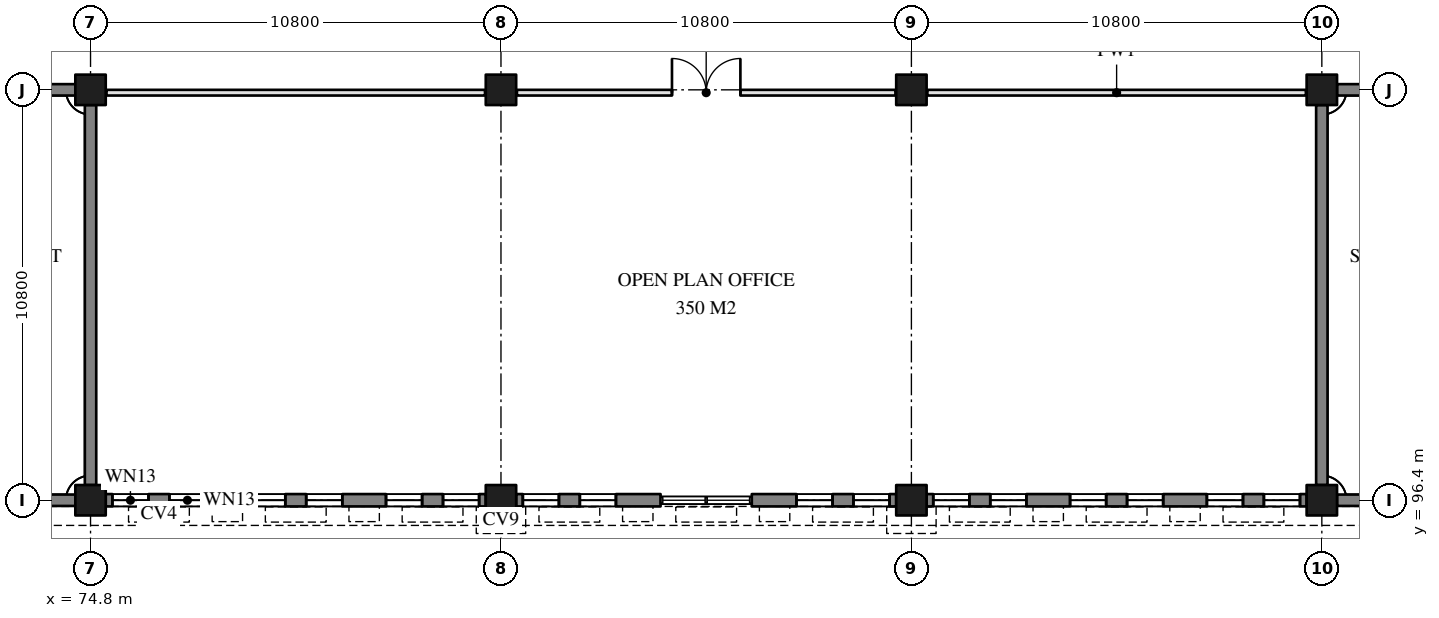
"""IFC4 building model, lengths in metres.
Left out: names, types, materials, properties, quantities, classifications, styles, units other than length and angle.
Written with IfcOpenShell. Run it as: python <this file> out.ifc"""

import sys

from ifc_helpers import new_model, si_unit, direction, frame, frame_2d, origin, origin_2d, place, context, subcontext, project, spatial, rectangle, extrude, element, fill, save


model = new_model("IFC4")
c1 = context("Model", 3, precision=1e-05, world=origin(), true_north=direction((0.0, 1.0)))
c2 = subcontext(c1, "Body", "Model", "MODEL_VIEW")
j1 = project(units=[si_unit("LENGTHUNIT", "METRE"), si_unit("PLANEANGLEUNIT", "RADIAN")], contexts=[c1])
p1 = place(None, origin())
s1 = spatial("IfcSite", under=j1, at=p1, CompositionType="ELEMENT")
p2 = place(p1, origin())
s2 = spatial("IfcBuilding", under=s1, at=p2, CompositionType="ELEMENT")
p3 = place(p2, frame((0.0, 0.0, 12.6)))
s3 = spatial("IfcBuildingStorey", under=s2, at=p3, CompositionType="ELEMENT", Elevation=12.6)
for number, where, z_axis, x_axis in (
    (1, (74.8, 96.4, 0.0), (0.0, 0.0, 1.0), (1.0, 0.0, 0.0)),
    (2, (74.8, 107.2, 0.0), (0.0, 0.0, 1.0), (1.0, 0.0, 0.0)),
    (3, (85.6, 96.4, 0.0), (0.0, 0.0, 1.0), (1.0, 0.0, 0.0)),
    (4, (85.6, 107.2, 0.0), (0.0, 0.0, 1.0), (1.0, 0.0, 0.0)),
    (5, (96.4, 96.4, 0.0), (0.0, 0.0, 1.0), (1.0, 0.0, 0.0)),
    (6, (96.4, 107.2, 0.0), (0.0, 0.0, 1.0), (1.0, 0.0, 0.0)),
    (7, (107.2, 96.4, 0.0), (0.0, 0.0, 1.0), (1.0, 0.0, 0.0)),
    (8, (107.2, 107.2, 0.0), (0.0, 0.0, 1.0), (1.0, 0.0, 0.0)),
):
    element("IfcColumn", number, at=place(p3, frame(where, z_axis=z_axis, x_axis=x_axis)), inside=s3, PredefinedType="COLUMN", context=c2, shape_type="SweptSolid", body=[
        extrude(rectangle(XDim=0.8, YDim=0.8, at=origin_2d()), origin(), (0.0, 0.0, 1.0), 3.9),
    ])
for number, where, z_axis, x_axis in (
    (9, (64.4, 96.4, 0.0), (0.0, 0.0, 1.0), (1.0, 0.0, 0.0)),
    (10, (74.8, 96.8, 0.0), (0.0, 0.0, 1.0), (0.0, 1.0, 0.0)),
):
    element("IfcWall", number, at=place(p3, frame(where, z_axis=z_axis, x_axis=x_axis)), inside=s3, PredefinedType="SOLIDWALL", context=c2, shape_type="SweptSolid", body=[
        extrude(rectangle(XDim=10.0, YDim=0.3, at=frame_2d((5.0, 0.0))), origin(), (0.0, 0.0, 1.0), 3.9),
    ])
p4 = place(p3, frame((74.4, 107.2, 0.0), z_axis=(0.0, 0.0, 1.0), x_axis=(-1.0, 0.0, 0.0)))
e11 = element("IfcWall", 11, at=p4, inside=s3, PredefinedType="SOLIDWALL", context=c2, shape_type="SweptSolid", body=[
    extrude(rectangle(XDim=10.0, YDim=0.3, at=frame_2d((5.0, 0.0))), origin(), (0.0, 0.0, 1.0), 3.9),
])
p5 = place(p4, frame((2.0, 0.0, 0.0)))
e12 = element("IfcOpeningElement", 12, at=p5, cuts=e11, PredefinedType="OPENING", context=c2, shape_type="SweptSolid", body=[
    extrude(rectangle(XDim=1.8, YDim=2.1, at=frame_2d((0.9, 1.05))), frame((0.0, 0.16, 0.0), z_axis=(0.0, -1.0, 0.0), x_axis=(1.0, 0.0, 0.0)), (0.0, 0.0, 1.0), 0.32),
])
p6 = place(p4, frame((4.4, 0.0, 0.0)))
e13 = element("IfcOpeningElement", 13, at=p6, cuts=e11, PredefinedType="OPENING", context=c2, shape_type="SweptSolid", body=[
    extrude(rectangle(XDim=1.0, YDim=2.1, at=frame_2d((0.5, 1.05))), frame((0.0, 0.16, 0.0), z_axis=(0.0, -1.0, 0.0), x_axis=(1.0, 0.0, 0.0)), (0.0, 0.0, 1.0), 0.32),
])
p7 = place(p4, frame((6.8, 0.0, 0.0)))
e14 = element("IfcOpeningElement", 14, at=p7, cuts=e11, PredefinedType="OPENING", context=c2, shape_type="SweptSolid", body=[
    extrude(rectangle(XDim=0.9, YDim=2.1, at=frame_2d((0.45, 1.05))), frame((0.0, 0.16, 0.0), z_axis=(0.0, -1.0, 0.0), x_axis=(1.0, 0.0, 0.0)), (0.0, 0.0, 1.0), 0.32),
])
p8 = place(p3, frame((107.6, 96.4, 0.0), z_axis=(0.0, 0.0, 1.0), x_axis=(1.0, 0.0, 0.0)))
e15 = element("IfcWall", 15, at=p8, inside=s3, PredefinedType="SOLIDWALL", context=c2, shape_type="SweptSolid", body=[
    extrude(rectangle(XDim=10.0, YDim=0.3, at=frame_2d((5.0, 0.0))), origin(), (0.0, 0.0, 1.0), 3.9),
])
p9 = place(p3, frame((117.6, 107.2, 0.0), z_axis=(0.0, 0.0, 1.0), x_axis=(-1.0, 0.0, 0.0)))
e16 = element("IfcWall", 16, at=p9, inside=s3, PredefinedType="SOLIDWALL", context=c2, shape_type="SweptSolid", body=[
    extrude(rectangle(XDim=10.0, YDim=0.3, at=frame_2d((5.0, 0.0))), origin(), (0.0, 0.0, 1.0), 3.9),
])
p10 = place(p9, frame((6.2, 0.0, 0.0)))
e17 = element("IfcOpeningElement", 17, at=p10, cuts=e16, PredefinedType="OPENING", context=c2, shape_type="SweptSolid", body=[
    extrude(rectangle(XDim=1.8, YDim=2.1, at=frame_2d((0.9, 1.05))), frame((0.0, 0.16, 0.0), z_axis=(0.0, -1.0, 0.0), x_axis=(1.0, 0.0, 0.0)), (0.0, 0.0, 1.0), 0.32),
])
p11 = place(p9, frame((4.6, 0.0, 0.0)))
e18 = element("IfcOpeningElement", 18, at=p11, cuts=e16, PredefinedType="OPENING", context=c2, shape_type="SweptSolid", body=[
    extrude(rectangle(XDim=1.0, YDim=2.1, at=frame_2d((0.5, 1.05))), frame((0.0, 0.16, 0.0), z_axis=(0.0, -1.0, 0.0), x_axis=(1.0, 0.0, 0.0)), (0.0, 0.0, 1.0), 0.32),
])
p12 = place(p9, frame((2.3, 0.0, 0.0)))
e19 = element("IfcOpeningElement", 19, at=p12, cuts=e16, PredefinedType="OPENING", context=c2, shape_type="SweptSolid", body=[
    extrude(rectangle(XDim=0.9, YDim=2.1, at=frame_2d((0.45, 1.05))), frame((0.0, 0.16, 0.0), z_axis=(0.0, -1.0, 0.0), x_axis=(1.0, 0.0, 0.0)), (0.0, 0.0, 1.0), 0.32),
])
p13 = place(p3, frame((107.2, 106.8, 0.0), z_axis=(0.0, 0.0, 1.0), x_axis=(0.0, -1.0, 0.0)))
e20 = element("IfcWall", 20, at=p13, inside=s3, PredefinedType="SOLIDWALL", context=c2, shape_type="SweptSolid", body=[
    extrude(rectangle(XDim=10.0, YDim=0.3, at=frame_2d((5.0, 0.0))), origin(), (0.0, 0.0, 1.0), 3.9),
])
p14 = place(p3, frame((75.2, 96.4, 0.0), z_axis=(0.0, 0.0, 1.0), x_axis=(1.0, 0.0, 0.0)))
e21 = element("IfcWall", 21, at=p14, inside=s3, PredefinedType="SOLIDWALL", context=c2, shape_type="SweptSolid", body=[
    extrude(rectangle(XDim=10.0, YDim=0.325, at=frame_2d((5.0, 0.0))), origin(), (0.0, 0.0, 1.0), 2.8),
])
p15 = place(p14, frame((0.175, 0.0, 0.5)))
e22 = element("IfcOpeningElement", 22, at=p15, cuts=e21, PredefinedType="OPENING", context=c2, shape_type="SweptSolid", body=[
    extrude(rectangle(XDim=0.95, YDim=2.25, at=frame_2d((0.475, 1.125))), frame((0.0, 0.172, 0.0), z_axis=(0.0, -1.0, 0.0), x_axis=(1.0, 0.0, 0.0)), (0.0, 0.0, 1.0), 0.345),
])
p16 = place(p14, frame((3.775, 0.0, 0.5)))
e23 = element("IfcOpeningElement", 23, at=p16, cuts=e21, PredefinedType="OPENING", context=c2, shape_type="SweptSolid", body=[
    extrude(rectangle(XDim=0.95, YDim=2.25, at=frame_2d((0.475, 1.125))), frame((0.0, 0.172, 0.0), z_axis=(0.0, -1.0, 0.0), x_axis=(1.0, 0.0, 0.0)), (0.0, 0.0, 1.0), 0.345),
])
p17 = place(p14, frame((7.375, 0.0, 0.5)))
e24 = element("IfcOpeningElement", 24, at=p17, cuts=e21, PredefinedType="OPENING", context=c2, shape_type="SweptSolid", body=[
    extrude(rectangle(XDim=0.95, YDim=2.25, at=frame_2d((0.475, 1.125))), frame((0.0, 0.172, 0.0), z_axis=(0.0, -1.0, 0.0), x_axis=(1.0, 0.0, 0.0)), (0.0, 0.0, 1.0), 0.345),
])
p18 = place(p14, frame((1.675, 0.0, 0.5)))
e25 = element("IfcOpeningElement", 25, at=p18, cuts=e21, PredefinedType="OPENING", context=c2, shape_type="SweptSolid", body=[
    extrude(rectangle(XDim=0.95, YDim=2.25, at=frame_2d((0.475, 1.125))), frame((0.0, 0.172, 0.0), z_axis=(0.0, -1.0, 0.0), x_axis=(1.0, 0.0, 0.0)), (0.0, 0.0, 1.0), 0.345),
])
p19 = place(p14, frame((5.275, 0.0, 0.5)))
e26 = element("IfcOpeningElement", 26, at=p19, cuts=e21, PredefinedType="OPENING", context=c2, shape_type="SweptSolid", body=[
    extrude(rectangle(XDim=0.95, YDim=2.25, at=frame_2d((0.475, 1.125))), frame((0.0, 0.172, 0.0), z_axis=(0.0, -1.0, 0.0), x_axis=(1.0, 0.0, 0.0)), (0.0, 0.0, 1.0), 0.345),
])
p20 = place(p14, frame((8.875, 0.0, 0.5)))
e27 = element("IfcOpeningElement", 27, at=p20, cuts=e21, PredefinedType="OPENING", context=c2, shape_type="SweptSolid", body=[
    extrude(rectangle(XDim=0.95, YDim=2.25, at=frame_2d((0.475, 1.125))), frame((0.0, 0.172, 0.0), z_axis=(0.0, -1.0, 0.0), x_axis=(1.0, 0.0, 0.0)), (0.0, 0.0, 1.0), 0.345),
])
p21 = place(p3, frame((86.0, 96.4, 0.0), z_axis=(0.0, 0.0, 1.0), x_axis=(1.0, 0.0, 0.0)))
e28 = element("IfcWall", 28, at=p21, inside=s3, PredefinedType="SOLIDWALL", context=c2, shape_type="SweptSolid", body=[
    extrude(rectangle(XDim=3.8, YDim=0.325, at=frame_2d((1.9, 0.0))), origin(), (0.0, 0.0, 1.0), 2.8),
])
p22 = place(p21, frame((0.175, 0.0, 0.5)))
e29 = element("IfcOpeningElement", 29, at=p22, cuts=e28, PredefinedType="OPENING", context=c2, shape_type="SweptSolid", body=[
    extrude(rectangle(XDim=0.95, YDim=2.25, at=frame_2d((0.475, 1.125))), frame((0.0, 0.172, 0.0), z_axis=(0.0, -1.0, 0.0), x_axis=(1.0, 0.0, 0.0)), (0.0, 0.0, 1.0), 0.345),
])
p23 = place(p21, frame((1.675, 0.0, 0.5)))
e30 = element("IfcOpeningElement", 30, at=p23, cuts=e28, PredefinedType="OPENING", context=c2, shape_type="SweptSolid", body=[
    extrude(rectangle(XDim=0.95, YDim=2.25, at=frame_2d((0.475, 1.125))), frame((0.0, 0.172, 0.0), z_axis=(0.0, -1.0, 0.0), x_axis=(1.0, 0.0, 0.0)), (0.0, 0.0, 1.0), 0.345),
])
p24 = place(p3, frame((92.2, 96.4, 0.0), z_axis=(0.0, 0.0, 1.0), x_axis=(1.0, 0.0, 0.0)))
e31 = element("IfcWall", 31, at=p24, inside=s3, PredefinedType="SOLIDWALL", context=c2, shape_type="SweptSolid", body=[
    extrude(rectangle(XDim=3.8, YDim=0.325, at=frame_2d((1.9, 0.0))), origin(), (0.0, 0.0, 1.0), 2.8),
])
p25 = place(p24, frame((1.175, 0.0, 0.5)))
e32 = element("IfcOpeningElement", 32, at=p25, cuts=e31, PredefinedType="OPENING", context=c2, shape_type="SweptSolid", body=[
    extrude(rectangle(XDim=0.95, YDim=2.25, at=frame_2d((0.475, 1.125))), frame((0.0, 0.172, 0.0), z_axis=(0.0, -1.0, 0.0), x_axis=(1.0, 0.0, 0.0)), (0.0, 0.0, 1.0), 0.345),
])
p26 = place(p24, frame((2.675, 0.0, 0.5)))
e33 = element("IfcOpeningElement", 33, at=p26, cuts=e31, PredefinedType="OPENING", context=c2, shape_type="SweptSolid", body=[
    extrude(rectangle(XDim=0.95, YDim=2.25, at=frame_2d((0.475, 1.125))), frame((0.0, 0.172, 0.0), z_axis=(0.0, -1.0, 0.0), x_axis=(1.0, 0.0, 0.0)), (0.0, 0.0, 1.0), 0.345),
])
p27 = place(p3, frame((96.8, 96.4, 0.0), z_axis=(0.0, 0.0, 1.0), x_axis=(1.0, 0.0, 0.0)))
e34 = element("IfcWall", 34, at=p27, inside=s3, PredefinedType="SOLIDWALL", context=c2, shape_type="SweptSolid", body=[
    extrude(rectangle(XDim=10.0, YDim=0.325, at=frame_2d((5.0, 0.0))), origin(), (0.0, 0.0, 1.0), 2.8),
])
p28 = place(p27, frame((0.175, 0.0, 0.5)))
e35 = element("IfcOpeningElement", 35, at=p28, cuts=e34, PredefinedType="OPENING", context=c2, shape_type="SweptSolid", body=[
    extrude(rectangle(XDim=0.95, YDim=2.25, at=frame_2d((0.475, 1.125))), frame((0.0, 0.172, 0.0), z_axis=(0.0, -1.0, 0.0), x_axis=(1.0, 0.0, 0.0)), (0.0, 0.0, 1.0), 0.345),
])
p29 = place(p27, frame((3.775, 0.0, 0.5)))
e36 = element("IfcOpeningElement", 36, at=p29, cuts=e34, PredefinedType="OPENING", context=c2, shape_type="SweptSolid", body=[
    extrude(rectangle(XDim=0.95, YDim=2.25, at=frame_2d((0.475, 1.125))), frame((0.0, 0.172, 0.0), z_axis=(0.0, -1.0, 0.0), x_axis=(1.0, 0.0, 0.0)), (0.0, 0.0, 1.0), 0.345),
])
p30 = place(p27, frame((7.375, 0.0, 0.5)))
e37 = element("IfcOpeningElement", 37, at=p30, cuts=e34, PredefinedType="OPENING", context=c2, shape_type="SweptSolid", body=[
    extrude(rectangle(XDim=0.95, YDim=2.25, at=frame_2d((0.475, 1.125))), frame((0.0, 0.172, 0.0), z_axis=(0.0, -1.0, 0.0), x_axis=(1.0, 0.0, 0.0)), (0.0, 0.0, 1.0), 0.345),
])
p31 = place(p27, frame((1.675, 0.0, 0.5)))
e38 = element("IfcOpeningElement", 38, at=p31, cuts=e34, PredefinedType="OPENING", context=c2, shape_type="SweptSolid", body=[
    extrude(rectangle(XDim=0.95, YDim=2.25, at=frame_2d((0.475, 1.125))), frame((0.0, 0.172, 0.0), z_axis=(0.0, -1.0, 0.0), x_axis=(1.0, 0.0, 0.0)), (0.0, 0.0, 1.0), 0.345),
])
p32 = place(p27, frame((5.275, 0.0, 0.5)))
e39 = element("IfcOpeningElement", 39, at=p32, cuts=e34, PredefinedType="OPENING", context=c2, shape_type="SweptSolid", body=[
    extrude(rectangle(XDim=0.95, YDim=2.25, at=frame_2d((0.475, 1.125))), frame((0.0, 0.172, 0.0), z_axis=(0.0, -1.0, 0.0), x_axis=(1.0, 0.0, 0.0)), (0.0, 0.0, 1.0), 0.345),
])
p33 = place(p27, frame((8.875, 0.0, 0.5)))
e40 = element("IfcOpeningElement", 40, at=p33, cuts=e34, PredefinedType="OPENING", context=c2, shape_type="SweptSolid", body=[
    extrude(rectangle(XDim=0.95, YDim=2.25, at=frame_2d((0.475, 1.125))), frame((0.0, 0.172, 0.0), z_axis=(0.0, -1.0, 0.0), x_axis=(1.0, 0.0, 0.0)), (0.0, 0.0, 1.0), 0.345),
])
p34 = place(p3, frame((96.82, 107.125, 0.0), z_axis=(0.0, 0.0, 1.0), x_axis=(1.0, 0.0, 0.0)))
e41 = element("IfcWall", 41, at=p34, inside=s3, PredefinedType="PARTITIONING", context=c2, shape_type="SweptSolid", body=[
    extrude(rectangle(XDim=9.96, YDim=0.15, at=frame_2d((4.98, 0.0))), origin(), (0.0, 0.0, 1.0), 2.8),
])
p35 = place(p3, frame((86.02, 107.125, 0.0), z_axis=(0.0, 0.0, 1.0), x_axis=(1.0, 0.0, 0.0)))
e42 = element("IfcWall", 42, at=p35, inside=s3, PredefinedType="PARTITIONING", context=c2, shape_type="SweptSolid", body=[
    extrude(rectangle(XDim=9.96, YDim=0.15, at=frame_2d((4.98, 0.0))), origin(), (0.0, 0.0, 1.0), 2.8),
])
p36 = place(p35, frame((4.08, 0.0, 0.0)))
e43 = element("IfcOpeningElement", 43, at=p36, cuts=e42, PredefinedType="OPENING", context=c2, shape_type="SweptSolid", body=[
    extrude(rectangle(XDim=1.8, YDim=2.1, at=frame_2d((0.9, 1.05))), frame((0.0, 0.085, 0.0), z_axis=(0.0, -1.0, 0.0), x_axis=(1.0, 0.0, 0.0)), (0.0, 0.0, 1.0), 0.17),
])
p37 = place(p3, frame((75.22, 107.125, 0.0), z_axis=(0.0, 0.0, 1.0), x_axis=(1.0, 0.0, 0.0)))
e44 = element("IfcWall", 44, at=p37, inside=s3, PredefinedType="PARTITIONING", context=c2, shape_type="SweptSolid", body=[
    extrude(rectangle(XDim=9.96, YDim=0.15, at=frame_2d((4.98, 0.0))), origin(), (0.0, 0.0, 1.0), 2.8),
])
p38 = place(p15, origin())
e45 = element("IfcWindow", 45, at=p38, inside=s3, PartitioningType="SINGLE_PANEL", PredefinedType="WINDOW", context=c2, shape_type="SweptSolid", body=[
    extrude(rectangle(XDim=0.95, YDim=2.25, at=frame_2d((0.475, 1.125))), frame((0.0, 0.03, 0.0), z_axis=(0.0, -1.0, 0.0), x_axis=(1.0, 0.0, 0.0)), (0.0, 0.0, 1.0), 0.06),
])
fill(e22, e45)
p39 = place(p16, origin())
e46 = element("IfcWindow", 46, at=p39, inside=s3, PartitioningType="SINGLE_PANEL", PredefinedType="WINDOW", context=c2, shape_type="SweptSolid", body=[
    extrude(rectangle(XDim=0.95, YDim=2.25, at=frame_2d((0.475, 1.125))), frame((0.0, 0.03, 0.0), z_axis=(0.0, -1.0, 0.0), x_axis=(1.0, 0.0, 0.0)), (0.0, 0.0, 1.0), 0.06),
])
fill(e23, e46)
p40 = place(p17, origin())
e47 = element("IfcWindow", 47, at=p40, inside=s3, PartitioningType="SINGLE_PANEL", PredefinedType="WINDOW", context=c2, shape_type="SweptSolid", body=[
    extrude(rectangle(XDim=0.95, YDim=2.25, at=frame_2d((0.475, 1.125))), frame((0.0, 0.03, 0.0), z_axis=(0.0, -1.0, 0.0), x_axis=(1.0, 0.0, 0.0)), (0.0, 0.0, 1.0), 0.06),
])
fill(e24, e47)
p41 = place(p22, origin())
e48 = element("IfcWindow", 48, at=p41, inside=s3, PartitioningType="SINGLE_PANEL", PredefinedType="WINDOW", context=c2, shape_type="SweptSolid", body=[
    extrude(rectangle(XDim=0.95, YDim=2.25, at=frame_2d((0.475, 1.125))), frame((0.0, 0.03, 0.0), z_axis=(0.0, -1.0, 0.0), x_axis=(1.0, 0.0, 0.0)), (0.0, 0.0, 1.0), 0.06),
])
fill(e29, e48)
p42 = place(p18, origin())
e49 = element("IfcWindow", 49, at=p42, inside=s3, PartitioningType="SINGLE_PANEL", PredefinedType="WINDOW", context=c2, shape_type="SweptSolid", body=[
    extrude(rectangle(XDim=0.95, YDim=2.25, at=frame_2d((0.475, 1.125))), frame((0.0, 0.03, 0.0), z_axis=(0.0, -1.0, 0.0), x_axis=(1.0, 0.0, 0.0)), (0.0, 0.0, 1.0), 0.06),
])
fill(e25, e49)
p43 = place(p19, origin())
e50 = element("IfcWindow", 50, at=p43, inside=s3, PartitioningType="SINGLE_PANEL", PredefinedType="WINDOW", context=c2, shape_type="SweptSolid", body=[
    extrude(rectangle(XDim=0.95, YDim=2.25, at=frame_2d((0.475, 1.125))), frame((0.0, 0.03, 0.0), z_axis=(0.0, -1.0, 0.0), x_axis=(1.0, 0.0, 0.0)), (0.0, 0.0, 1.0), 0.06),
])
fill(e26, e50)
p44 = place(p20, origin())
e51 = element("IfcWindow", 51, at=p44, inside=s3, PartitioningType="SINGLE_PANEL", PredefinedType="WINDOW", context=c2, shape_type="SweptSolid", body=[
    extrude(rectangle(XDim=0.95, YDim=2.25, at=frame_2d((0.475, 1.125))), frame((0.0, 0.03, 0.0), z_axis=(0.0, -1.0, 0.0), x_axis=(1.0, 0.0, 0.0)), (0.0, 0.0, 1.0), 0.06),
])
fill(e27, e51)
p45 = place(p23, origin())
e52 = element("IfcWindow", 52, at=p45, inside=s3, PartitioningType="SINGLE_PANEL", PredefinedType="WINDOW", context=c2, shape_type="SweptSolid", body=[
    extrude(rectangle(XDim=0.95, YDim=2.25, at=frame_2d((0.475, 1.125))), frame((0.0, 0.03, 0.0), z_axis=(0.0, -1.0, 0.0), x_axis=(1.0, 0.0, 0.0)), (0.0, 0.0, 1.0), 0.06),
])
fill(e30, e52)
p46 = place(p25, origin())
e53 = element("IfcWindow", 53, at=p46, inside=s3, PartitioningType="SINGLE_PANEL", PredefinedType="WINDOW", context=c2, shape_type="SweptSolid", body=[
    extrude(rectangle(XDim=0.95, YDim=2.25, at=frame_2d((0.475, 1.125))), frame((0.0, 0.03, 0.0), z_axis=(0.0, -1.0, 0.0), x_axis=(1.0, 0.0, 0.0)), (0.0, 0.0, 1.0), 0.06),
])
fill(e32, e53)
p47 = place(p28, origin())
e54 = element("IfcWindow", 54, at=p47, inside=s3, PartitioningType="SINGLE_PANEL", PredefinedType="WINDOW", context=c2, shape_type="SweptSolid", body=[
    extrude(rectangle(XDim=0.95, YDim=2.25, at=frame_2d((0.475, 1.125))), frame((0.0, 0.03, 0.0), z_axis=(0.0, -1.0, 0.0), x_axis=(1.0, 0.0, 0.0)), (0.0, 0.0, 1.0), 0.06),
])
fill(e35, e54)
p48 = place(p29, origin())
e55 = element("IfcWindow", 55, at=p48, inside=s3, PartitioningType="SINGLE_PANEL", PredefinedType="WINDOW", context=c2, shape_type="SweptSolid", body=[
    extrude(rectangle(XDim=0.95, YDim=2.25, at=frame_2d((0.475, 1.125))), frame((0.0, 0.03, 0.0), z_axis=(0.0, -1.0, 0.0), x_axis=(1.0, 0.0, 0.0)), (0.0, 0.0, 1.0), 0.06),
])
fill(e36, e55)
p49 = place(p30, origin())
e56 = element("IfcWindow", 56, at=p49, inside=s3, PartitioningType="SINGLE_PANEL", PredefinedType="WINDOW", context=c2, shape_type="SweptSolid", body=[
    extrude(rectangle(XDim=0.95, YDim=2.25, at=frame_2d((0.475, 1.125))), frame((0.0, 0.03, 0.0), z_axis=(0.0, -1.0, 0.0), x_axis=(1.0, 0.0, 0.0)), (0.0, 0.0, 1.0), 0.06),
])
fill(e37, e56)
p50 = place(p26, origin())
e57 = element("IfcWindow", 57, at=p50, inside=s3, PartitioningType="SINGLE_PANEL", PredefinedType="WINDOW", context=c2, shape_type="SweptSolid", body=[
    extrude(rectangle(XDim=0.95, YDim=2.25, at=frame_2d((0.475, 1.125))), frame((0.0, 0.03, 0.0), z_axis=(0.0, -1.0, 0.0), x_axis=(1.0, 0.0, 0.0)), (0.0, 0.0, 1.0), 0.06),
])
fill(e33, e57)
p51 = place(p31, origin())
e58 = element("IfcWindow", 58, at=p51, inside=s3, PartitioningType="SINGLE_PANEL", PredefinedType="WINDOW", context=c2, shape_type="SweptSolid", body=[
    extrude(rectangle(XDim=0.95, YDim=2.25, at=frame_2d((0.475, 1.125))), frame((0.0, 0.03, 0.0), z_axis=(0.0, -1.0, 0.0), x_axis=(1.0, 0.0, 0.0)), (0.0, 0.0, 1.0), 0.06),
])
fill(e38, e58)
p52 = place(p32, origin())
e59 = element("IfcWindow", 59, at=p52, inside=s3, PartitioningType="SINGLE_PANEL", PredefinedType="WINDOW", context=c2, shape_type="SweptSolid", body=[
    extrude(rectangle(XDim=0.95, YDim=2.25, at=frame_2d((0.475, 1.125))), frame((0.0, 0.03, 0.0), z_axis=(0.0, -1.0, 0.0), x_axis=(1.0, 0.0, 0.0)), (0.0, 0.0, 1.0), 0.06),
])
fill(e39, e59)
p53 = place(p33, origin())
e60 = element("IfcWindow", 60, at=p53, inside=s3, PartitioningType="SINGLE_PANEL", PredefinedType="WINDOW", context=c2, shape_type="SweptSolid", body=[
    extrude(rectangle(XDim=0.95, YDim=2.25, at=frame_2d((0.475, 1.125))), frame((0.0, 0.03, 0.0), z_axis=(0.0, -1.0, 0.0), x_axis=(1.0, 0.0, 0.0)), (0.0, 0.0, 1.0), 0.06),
])
fill(e40, e60)
p54 = place(p36, frame((1.8, 0.0, 0.0), z_axis=(0.0, 0.0, 1.0), x_axis=(-1.0, 0.0, 0.0)))
e61 = element("IfcDoor", 61, at=p54, inside=s3, OperationType="DOUBLE_DOOR_DOUBLE_SWING", PredefinedType="DOOR", context=c2, shape_type="SweptSolid", body=[
    extrude(rectangle(XDim=1.8, YDim=2.1, at=frame_2d((0.9, 1.05))), frame((0.0, 0.025, 0.0), z_axis=(0.0, -1.0, 0.0), x_axis=(1.0, 0.0, 0.0)), (0.0, 0.0, 1.0), 0.05),
])
fill(e43, e61)
save(model, sys.argv[1])
